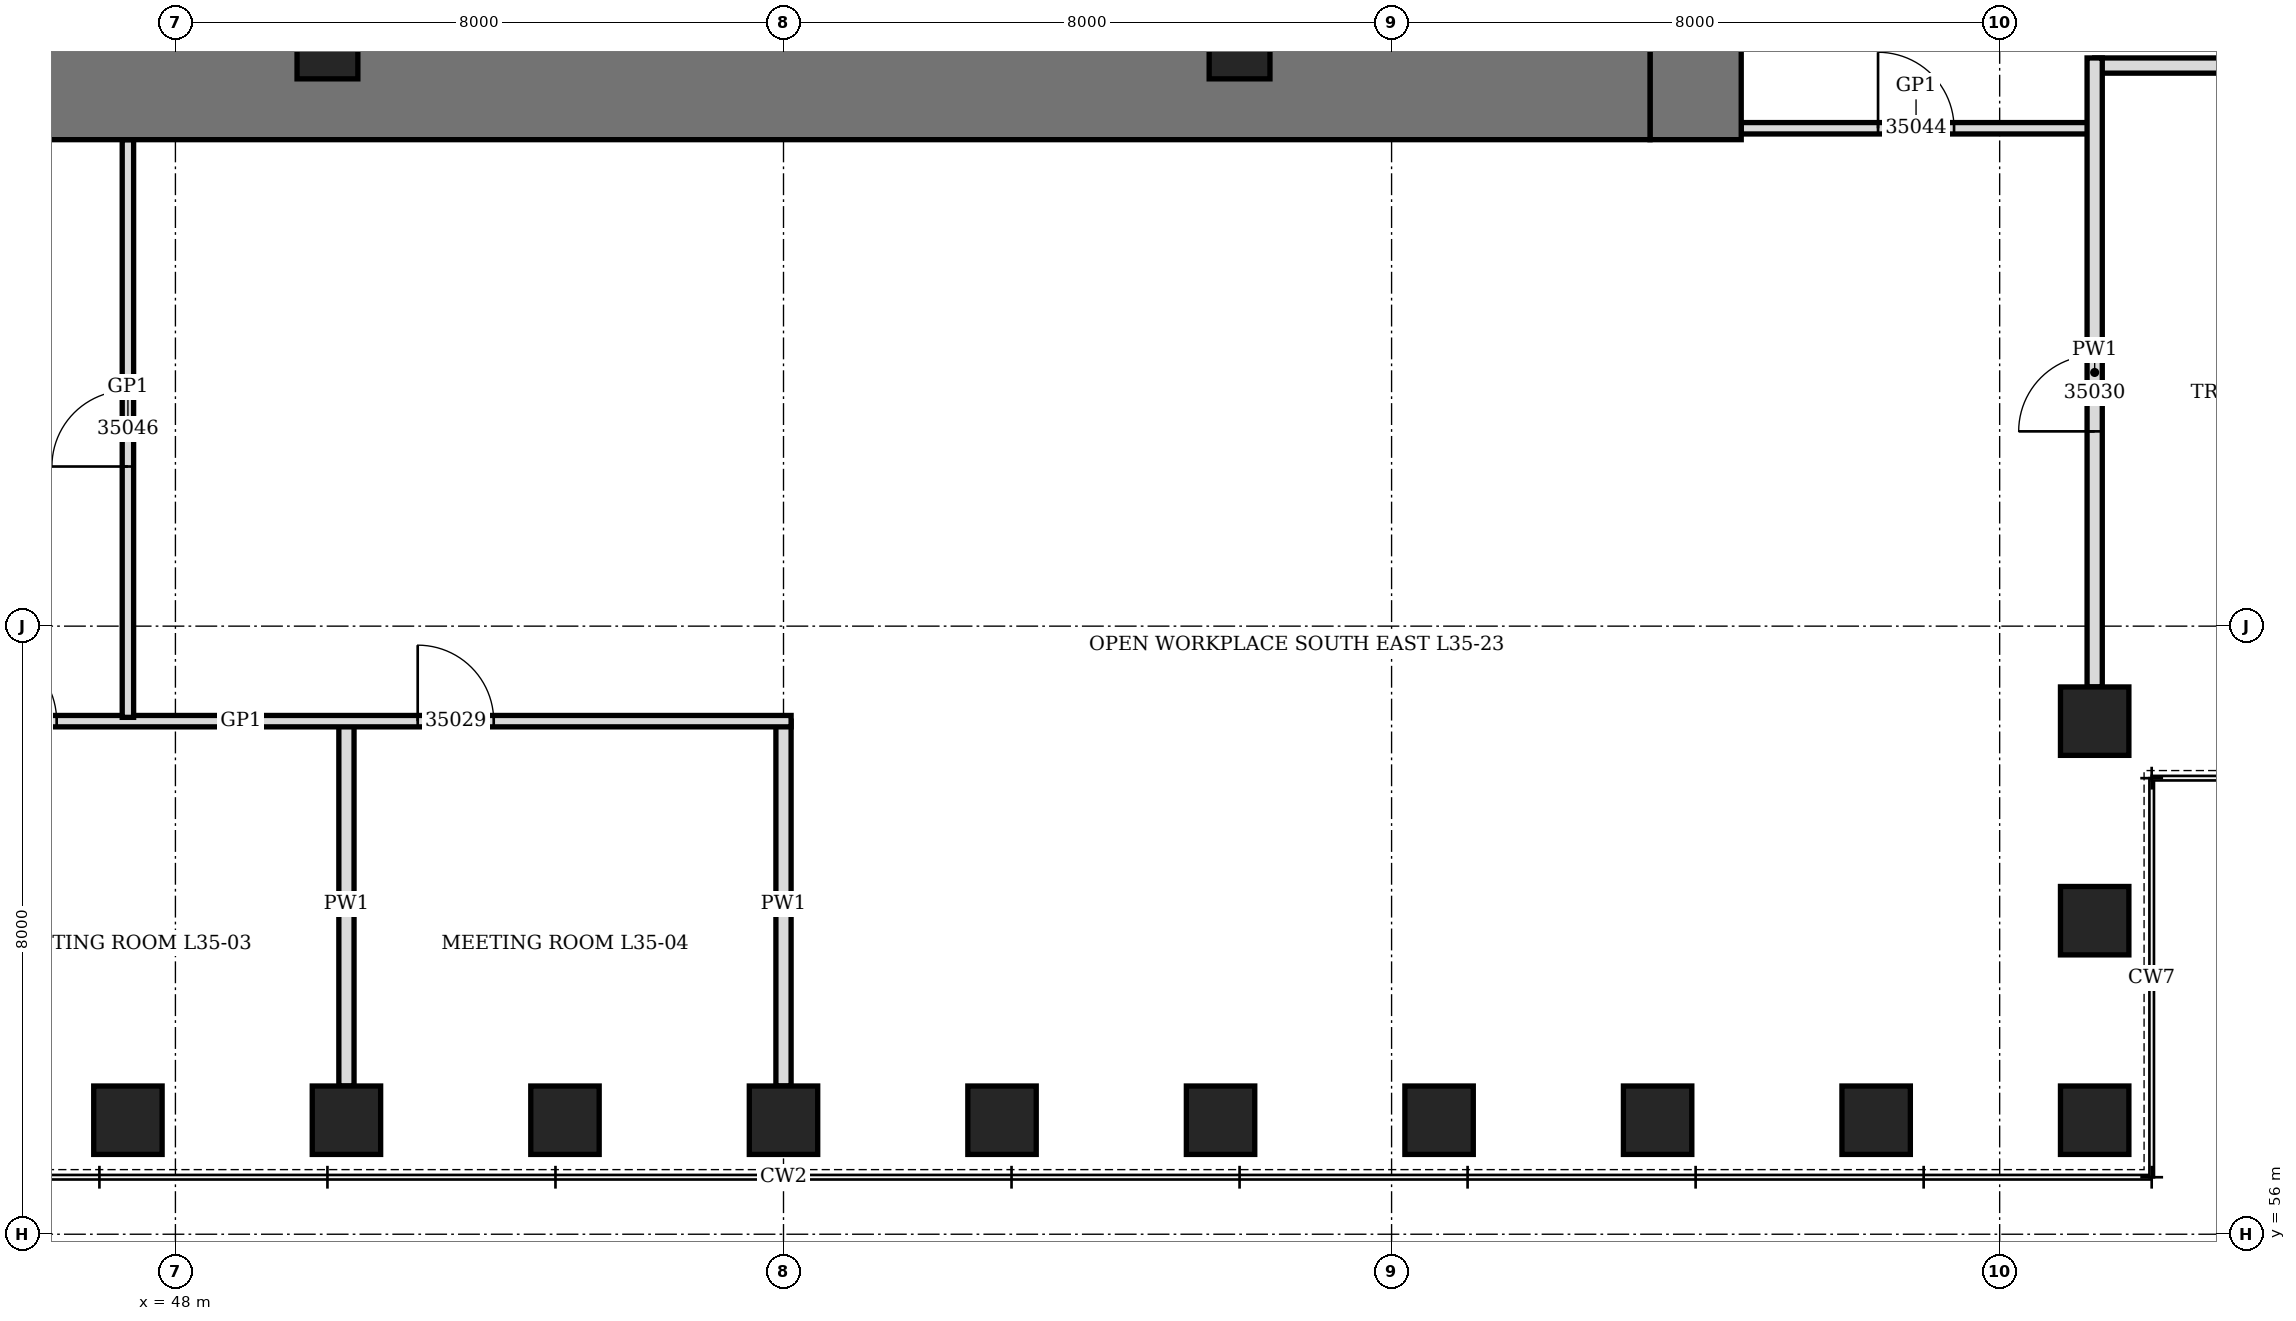
"""IFC4 building model, lengths in metres.
Left out: names, types, materials, properties, quantities, classifications, styles, units other than length and angle.
Written with IfcOpenShell. Run it as: python <this file> out.ifc"""

import sys

from ifc_helpers import new_model, si_unit, direction, frame, frame_2d, origin, origin_2d, place, context, subcontext, project, spatial, rectangle, hollow_rectangle, extrude, element, fill, save


model = new_model("IFC4")
c1 = context("Model", 3, precision=1e-05, world=origin(), true_north=direction((0.0, 1.0)))
c2 = subcontext(c1, "Body", "Model", "MODEL_VIEW")
j1 = project(units=[si_unit("LENGTHUNIT", "METRE"), si_unit("PLANEANGLEUNIT", "RADIAN")], contexts=[c1])
p1 = place(None, origin())
s1 = spatial("IfcSite", under=j1, at=p1, CompositionType="ELEMENT")
p2 = place(p1, origin())
s2 = spatial("IfcBuilding", under=s1, at=p2, CompositionType="ELEMENT")
p3 = place(p2, frame((0.0, 0.0, 158.5)))
s3 = spatial("IfcBuildingStorey", under=s2, at=p3, CompositionType="ELEMENT", Elevation=158.5)
for number, where, z_axis, x_axis in (
    (1, (47.375, 57.5, 0.0), (0.0, 0.0, 1.0), (1.0, 0.0, 0.0)),
    (2, (50.25, 57.5, 0.0), (0.0, 0.0, 1.0), (1.0, 0.0, 0.0)),
    (3, (53.125, 57.5, 0.0), (0.0, 0.0, 1.0), (1.0, 0.0, 0.0)),
    (4, (56.0, 57.5, 0.0), (0.0, 0.0, 1.0), (1.0, 0.0, 0.0)),
    (5, (58.875, 57.5, 0.0), (0.0, 0.0, 1.0), (1.0, 0.0, 0.0)),
    (6, (61.75, 57.5, 0.0), (0.0, 0.0, 1.0), (1.0, 0.0, 0.0)),
    (7, (64.625, 57.5, 0.0), (0.0, 0.0, 1.0), (1.0, 0.0, 0.0)),
    (8, (67.5, 57.5, 0.0), (0.0, 0.0, 1.0), (1.0, 0.0, 0.0)),
    (9, (70.375, 57.5, 0.0), (0.0, 0.0, 1.0), (1.0, 0.0, 0.0)),
    (10, (73.25, 57.5, 0.0), (0.0, 0.0, 1.0), (0.0, 1.0, 0.0)),
    (11, (73.25, 60.125, 0.0), (0.0, 0.0, 1.0), (0.0, 1.0, 0.0)),
    (12, (73.25, 62.75, 0.0), (0.0, 0.0, 1.0), (1.0, 0.0, 0.0)),
):
    element("IfcColumn", number, at=place(p3, frame(where, z_axis=z_axis, x_axis=x_axis)), inside=s3, PredefinedType="COLUMN", context=c2, shape_type="SweptSolid", body=[
        extrude(hollow_rectangle(XDim=0.9, YDim=0.9, WallThickness=0.12, at=origin_2d()), origin(), (0.0, 0.0, 1.0), 4.2),
    ])
p4 = place(p3, frame((68.0, 70.4, 0.0), z_axis=(0.0, 0.0, 1.0), x_axis=(0.0, 1.0, 0.0)))
e13 = element("IfcWall", 13, at=p4, inside=s3, PredefinedType="SHEAR", context=c2, shape_type="SweptSolid", body=[
    extrude(rectangle(XDim=19.2, YDim=1.2, at=frame_2d((9.6, 0.0))), origin(), (0.0, 0.0, 1.0), 4.2),
])
p5 = place(p4, frame((8.6, 0.0, 0.0)))
e14 = element("IfcOpeningElement", 14, at=p5, cuts=e13, PredefinedType="OPENING", context=c2, shape_type="SweptSolid", body=[
    extrude(rectangle(XDim=2.0, YDim=2.4, at=frame_2d((1.0, 1.2))), frame((0.0, 0.61, 0.0), z_axis=(0.0, -1.0, 0.0), x_axis=(1.0, 0.0, 0.0)), (0.0, 0.0, 1.0), 1.22),
])
p6 = place(p3, frame((44.6, 71.0, 0.0), z_axis=(0.0, 0.0, 1.0), x_axis=(1.0, 0.0, 0.0)))
e15 = element("IfcWall", 15, at=p6, inside=s3, PredefinedType="SHEAR", context=c2, shape_type="SweptSolid", body=[
    extrude(rectangle(XDim=22.8, YDim=1.2, at=frame_2d((11.4, 0.0))), origin(), (0.0, 0.0, 1.0), 4.2),
])
for number, where, z_axis, x_axis in (
    (16, (50.0, 71.6, 0.0), (0.0, 0.0, 1.0), (1.0, 0.0, 0.0)),
    (17, (62.0, 71.6, 0.0), (0.0, 0.0, 1.0), (1.0, 0.0, 0.0)),
):
    element("IfcColumn", number, at=place(p3, frame(where, z_axis=z_axis, x_axis=x_axis)), inside=s3, PredefinedType="COLUMN", context=c2, shape_type="SweptSolid", body=[
        extrude(hollow_rectangle(XDim=0.8, YDim=0.8, WallThickness=0.1, at=origin_2d()), origin(), (0.0, 0.0, 1.0), 4.2),
    ])
for number, where, z_axis, x_axis in (
    (18, (50.25, 57.95, 0.0), (0.0, 0.0, 1.0), (0.0, 1.0, 0.0)),
    (19, (56.0, 57.95, 0.0), (0.0, 0.0, 1.0), (0.0, 1.0, 0.0)),
):
    element("IfcWall", number, at=place(p3, frame(where, z_axis=z_axis, x_axis=x_axis)), inside=s3, PredefinedType="PARTITIONING", context=c2, shape_type="SweptSolid", body=[
        extrude(rectangle(XDim=4.8, YDim=0.2, at=frame_2d((2.4, 0.0))), origin(), (0.0, 0.0, 1.0), 3.278),
    ])
p7 = place(p3, frame((73.25, 71.375, 0.0), z_axis=(0.0, 0.0, 1.0), x_axis=(1.0, 0.0, 0.0)))
e20 = element("IfcWall", 20, at=p7, inside=s3, PredefinedType="PARTITIONING", context=c2, shape_type="SweptSolid", body=[
    extrude(rectangle(XDim=4.8, YDim=0.2, at=frame_2d((2.4, 0.0))), origin(), (0.0, 0.0, 1.0), 3.428),
])
p8 = place(p3, frame((41.625, 62.75, 0.0), z_axis=(0.0, 0.0, 1.0), x_axis=(1.0, 0.0, 0.0)))
e21 = element("IfcWall", 21, at=p8, inside=s3, PredefinedType="PARTITIONING", context=c2, shape_type="SweptSolid", body=[
    extrude(rectangle(XDim=14.475, YDim=0.15, at=frame_2d((7.238, 0.0))), origin(), (0.0, 0.0, 1.0), 4.04),
])
p9 = place(p8, frame((0.938, 0.0, 0.0)))
e22 = element("IfcOpeningElement", 22, at=p9, cuts=e21, PredefinedType="OPENING", context=c2, shape_type="SweptSolid", body=[
    extrude(rectangle(XDim=1.0, YDim=2.4, at=frame_2d((0.5, 1.2))), frame((0.0, 0.085, 0.0), z_axis=(0.0, -1.0, 0.0), x_axis=(1.0, 0.0, 0.0)), (0.0, 0.0, 1.0), 0.17),
])
p10 = place(p8, frame((3.812, 0.0, 0.0)))
e23 = element("IfcOpeningElement", 23, at=p10, cuts=e21, PredefinedType="OPENING", context=c2, shape_type="SweptSolid", body=[
    extrude(rectangle(XDim=1.0, YDim=2.4, at=frame_2d((0.5, 1.2))), frame((0.0, 0.085, 0.0), z_axis=(0.0, -1.0, 0.0), x_axis=(1.0, 0.0, 0.0)), (0.0, 0.0, 1.0), 0.17),
])
p11 = place(p8, frame((9.562, 0.0, 0.0)))
e24 = element("IfcOpeningElement", 24, at=p11, cuts=e21, PredefinedType="OPENING", context=c2, shape_type="SweptSolid", body=[
    extrude(rectangle(XDim=1.0, YDim=2.4, at=frame_2d((0.5, 1.2))), frame((0.0, 0.085, 0.0), z_axis=(0.0, -1.0, 0.0), x_axis=(1.0, 0.0, 0.0)), (0.0, 0.0, 1.0), 0.17),
])
p12 = place(p3, frame((68.6, 70.55, 0.0), z_axis=(0.0, 0.0, 1.0), x_axis=(1.0, 0.0, 0.0)))
e25 = element("IfcWall", 25, at=p12, inside=s3, PredefinedType="PARTITIONING", context=c2, shape_type="SweptSolid", body=[
    extrude(rectangle(XDim=4.6, YDim=0.15, at=frame_2d((2.3, 0.0))), origin(), (0.0, 0.0, 1.0), 4.04),
])
p13 = place(p12, frame((1.8, 0.0, 0.0)))
e26 = element("IfcOpeningElement", 26, at=p13, cuts=e25, PredefinedType="OPENING", context=c2, shape_type="SweptSolid", body=[
    extrude(rectangle(XDim=1.0, YDim=2.4, at=frame_2d((0.5, 1.2))), frame((0.0, 0.085, 0.0), z_axis=(0.0, -1.0, 0.0), x_axis=(1.0, 0.0, 0.0)), (0.0, 0.0, 1.0), 0.17),
])
p14 = place(p3, frame((47.375, 62.8, 0.0), z_axis=(0.0, 0.0, 1.0), x_axis=(0.0, 1.0, 0.0)))
e27 = element("IfcWall", 27, at=p14, inside=s3, PredefinedType="PARTITIONING", context=c2, shape_type="SweptSolid", body=[
    extrude(rectangle(XDim=7.6, YDim=0.15, at=frame_2d((3.8, 0.0))), origin(), (0.0, 0.0, 1.0), 3.278),
])
p15 = place(p14, frame((3.3, 0.0, 0.0)))
e28 = element("IfcOpeningElement", 28, at=p15, cuts=e27, PredefinedType="OPENING", context=c2, shape_type="SweptSolid", body=[
    extrude(rectangle(XDim=1.0, YDim=2.4, at=frame_2d((0.5, 1.2))), frame((0.0, 0.085, 0.0), z_axis=(0.0, -1.0, 0.0), x_axis=(1.0, 0.0, 0.0)), (0.0, 0.0, 1.0), 0.17),
])
p16 = place(p3, frame((73.25, 63.2, 0.0), z_axis=(0.0, 0.0, 1.0), x_axis=(0.0, 1.0, 0.0)))
e29 = element("IfcWall", 29, at=p16, inside=s3, PredefinedType="PARTITIONING", context=c2, shape_type="SweptSolid", body=[
    extrude(rectangle(XDim=8.275, YDim=0.2, at=frame_2d((4.138, 0.0))), origin(), (0.0, 0.0, 1.0), 4.04),
])
p17 = place(p16, frame((3.363, 0.0, 0.0)))
e30 = element("IfcOpeningElement", 30, at=p17, cuts=e29, PredefinedType="OPENING", context=c2, shape_type="SweptSolid", body=[
    extrude(rectangle(XDim=1.0, YDim=2.1, at=frame_2d((0.5, 1.05))), frame((0.0, 0.11, 0.0), z_axis=(0.0, -1.0, 0.0), x_axis=(1.0, 0.0, 0.0)), (0.0, 0.0, 1.0), 0.22),
])
p18 = place(p10, origin())
e31 = element("IfcDoor", 31, at=p18, inside=s3, OperationType="SINGLE_SWING_RIGHT", PredefinedType="DOOR", context=c2, shape_type="SweptSolid", body=[
    extrude(rectangle(XDim=1.0, YDim=2.4, at=frame_2d((0.5, 1.2))), frame((0.0, 0.075, 0.0), z_axis=(0.0, -1.0, 0.0), x_axis=(1.0, 0.0, 0.0)), (0.0, 0.0, 1.0), 0.149),
])
fill(e23, e31)
p19 = place(p11, origin())
e32 = element("IfcDoor", 32, at=p19, inside=s3, OperationType="SINGLE_SWING_RIGHT", PredefinedType="DOOR", context=c2, shape_type="SweptSolid", body=[
    extrude(rectangle(XDim=1.0, YDim=2.4, at=frame_2d((0.5, 1.2))), frame((0.0, 0.075, 0.0), z_axis=(0.0, -1.0, 0.0), x_axis=(1.0, 0.0, 0.0)), (0.0, 0.0, 1.0), 0.149),
])
fill(e24, e32)
p20 = place(p17, origin())
e33 = element("IfcDoor", 33, at=p20, inside=s3, OperationType="SINGLE_SWING_LEFT", PredefinedType="DOOR", context=c2, shape_type="SweptSolid", body=[
    extrude(rectangle(XDim=1.0, YDim=2.1, at=frame_2d((0.5, 1.05))), frame((0.0, 0.1, 0.0), z_axis=(0.0, -1.0, 0.0), x_axis=(1.0, 0.0, 0.0)), (0.0, 0.0, 1.0), 0.199),
])
fill(e30, e33)
p21 = place(p13, origin())
e34 = element("IfcDoor", 34, at=p21, inside=s3, OperationType="SINGLE_SWING_RIGHT", PredefinedType="DOOR", context=c2, shape_type="SweptSolid", body=[
    extrude(rectangle(XDim=1.0, YDim=2.4, at=frame_2d((0.5, 1.2))), frame((0.0, 0.075, 0.0), z_axis=(0.0, -1.0, 0.0), x_axis=(1.0, 0.0, 0.0)), (0.0, 0.0, 1.0), 0.149),
])
fill(e26, e34)
p22 = place(p15, origin())
e35 = element("IfcDoor", 35, at=p22, inside=s3, OperationType="SINGLE_SWING_RIGHT", PredefinedType="DOOR", context=c2, shape_type="SweptSolid", body=[
    extrude(rectangle(XDim=1.0, YDim=2.4, at=frame_2d((0.5, 1.2))), frame((0.0, 0.075, 0.0), z_axis=(0.0, -1.0, 0.0), x_axis=(1.0, 0.0, 0.0)), (0.0, 0.0, 1.0), 0.149),
])
fill(e28, e35)
save(model, sys.argv[1])
